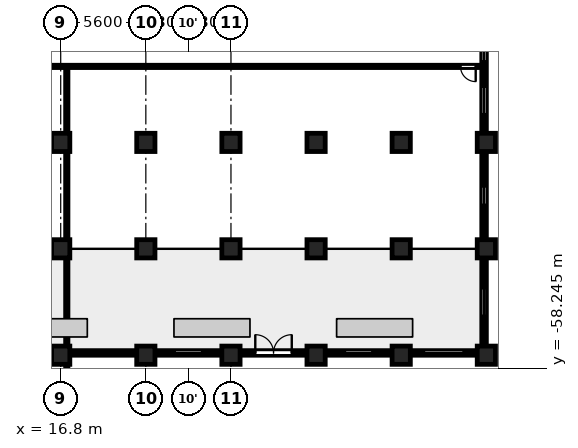
"""IFC4 building model, lengths in metres.
Left out: names, types, materials, properties, quantities, classifications, styles, units other than length and angle.
Written with IfcOpenShell. Run it as: python <this file> out.ifc"""

import sys

from ifc_helpers import new_model, si_unit, direction, frame, frame_2d, origin, origin_2d, place, context, subcontext, project, spatial, rectangle, circle, extrude, element, fill, save


model = new_model("IFC4")
c1 = context("Model", 3, precision=1e-05, world=origin(), true_north=direction((0.0, 1.0)))
c2 = subcontext(c1, "Body", "Model", "MODEL_VIEW")
j1 = project(units=[si_unit("LENGTHUNIT", "METRE"), si_unit("PLANEANGLEUNIT", "RADIAN")], contexts=[c1])
p1 = place(None, origin())
s1 = spatial("IfcSite", under=j1, at=p1, CompositionType="ELEMENT")
p2 = place(p1, origin())
s2 = spatial("IfcBuilding", under=s1, at=p2, CompositionType="ELEMENT")
p3 = place(p2, frame((0.0, 0.0, 6.5)))
s3 = spatial("IfcBuildingStorey", under=s2, at=p3, CompositionType="ELEMENT", Elevation=6.5)
for number, where, z_axis, x_axis in (
    (1, (16.8, -43.4, 0.0), (0.0, 0.0, 1.0), (1.0, 0.0, 0.0)),
    (2, (22.4, -43.4, 0.0), (0.0, 0.0, 1.0), (1.0, 0.0, 0.0)),
    (3, (28.0, -43.4, 0.0), (0.0, 0.0, 1.0), (1.0, 0.0, 0.0)),
    (4, (33.6, -43.4, 0.0), (0.0, 0.0, 1.0), (1.0, 0.0, 0.0)),
    (5, (39.2, -43.4, 0.0), (0.0, 0.0, 1.0), (1.0, 0.0, 0.0)),
    (6, (44.8, -43.4, 0.0), (0.0, 0.0, 1.0), (1.0, 0.0, 0.0)),
    (7, (16.8, -50.4, 0.0), (0.0, 0.0, 1.0), (1.0, 0.0, 0.0)),
    (8, (22.4, -50.4, 0.0), (0.0, 0.0, 1.0), (1.0, 0.0, 0.0)),
    (9, (28.0, -50.4, 0.0), (0.0, 0.0, 1.0), (1.0, 0.0, 0.0)),
    (10, (33.6, -50.4, 0.0), (0.0, 0.0, 1.0), (1.0, 0.0, 0.0)),
    (11, (39.2, -50.4, 0.0), (0.0, 0.0, 1.0), (1.0, 0.0, 0.0)),
    (12, (44.8, -50.4, 0.0), (0.0, 0.0, 1.0), (1.0, 0.0, 0.0)),
    (13, (16.8, -57.4, 0.0), (0.0, 0.0, 1.0), (1.0, 0.0, 0.0)),
    (14, (22.4, -57.4, 0.0), (0.0, 0.0, 1.0), (1.0, 0.0, 0.0)),
    (15, (28.0, -57.4, 0.0), (0.0, 0.0, 1.0), (1.0, 0.0, 0.0)),
    (16, (33.6, -57.4, 0.0), (0.0, 0.0, 1.0), (1.0, 0.0, 0.0)),
    (17, (39.2, -57.4, 0.0), (0.0, 0.0, 1.0), (1.0, 0.0, 0.0)),
    (18, (44.8, -57.4, 0.0), (0.0, 0.0, 1.0), (1.0, 0.0, 0.0)),
):
    element("IfcColumn", number, at=place(p3, frame(where, z_axis=z_axis, x_axis=x_axis)), inside=s3, PredefinedType="COLUMN", context=c2, shape_type="SweptSolid", body=[
        extrude(circle(Radius=0.6, at=origin_2d()), origin(), (0.0, 0.0, 1.0), 4.8),
    ])
p4 = place(p3, frame((44.65, -56.8, 0.0), z_axis=(0.0, 0.0, 1.0), x_axis=(0.0, 1.0, 0.0)))
e19 = element("IfcWall", 19, at=p4, inside=s3, PredefinedType="SOLIDWALL", context=c2, shape_type="SweptSolid", body=[
    extrude(rectangle(XDim=5.8, YDim=0.3, at=frame_2d((2.9, 0.0))), origin(), (0.0, 0.0, 1.0), 3.65),
])
p5 = place(p4, frame((2.0, 0.0, 0.9)))
e20 = element("IfcOpeningElement", 20, at=p5, cuts=e19, PredefinedType="OPENING", context=c2, shape_type="SweptSolid", body=[
    extrude(rectangle(XDim=1.8, YDim=1.25, at=frame_2d((0.9, 0.625))), frame((0.0, 0.16, 0.0), z_axis=(0.0, -1.0, 0.0), x_axis=(1.0, 0.0, 0.0)), (0.0, 0.0, 1.0), 0.32),
])
p6 = place(p3, frame((44.65, -49.8, 0.0), z_axis=(0.0, 0.0, 1.0), x_axis=(0.0, 1.0, 0.0)))
e21 = element("IfcWall", 21, at=p6, inside=s3, PredefinedType="SOLIDWALL", context=c2, shape_type="SweptSolid", body=[
    extrude(rectangle(XDim=5.8, YDim=0.3, at=frame_2d((2.9, 0.0))), origin(), (0.0, 0.0, 1.0), 3.65),
])
p7 = place(p6, frame((2.3, 0.0, 0.6)))
e22 = element("IfcOpeningElement", 22, at=p7, cuts=e21, PredefinedType="OPENING", context=c2, shape_type="SweptSolid", body=[
    extrude(rectangle(XDim=1.2, YDim=1.55, at=frame_2d((0.6, 0.775))), frame((0.0, 0.16, 0.0), z_axis=(0.0, -1.0, 0.0), x_axis=(1.0, 0.0, 0.0)), (0.0, 0.0, 1.0), 0.32),
])
p8 = place(p3, frame((44.65, -42.8, 0.0), z_axis=(0.0, 0.0, 1.0), x_axis=(0.0, 1.0, 0.0)))
e23 = element("IfcWall", 23, at=p8, inside=s3, PredefinedType="SOLIDWALL", context=c2, shape_type="SweptSolid", body=[
    extrude(rectangle(XDim=5.8, YDim=0.3, at=frame_2d((2.9, 0.0))), origin(), (0.0, 0.0, 1.0), 3.65),
])
p9 = place(p8, frame((1.262, 0.0, 0.9)))
e24 = element("IfcOpeningElement", 24, at=p9, cuts=e23, PredefinedType="OPENING", context=c2, shape_type="SweptSolid", body=[
    extrude(rectangle(XDim=1.8, YDim=1.25, at=frame_2d((0.9, 0.625))), frame((0.0, 0.16, 0.0), z_axis=(0.0, -1.0, 0.0), x_axis=(1.0, 0.0, 0.0)), (0.0, 0.0, 1.0), 0.32),
])
p10 = place(p8, frame((4.738, 0.0, 0.6)))
e25 = element("IfcOpeningElement", 25, at=p10, cuts=e23, PredefinedType="OPENING", context=c2, shape_type="SweptSolid", body=[
    extrude(rectangle(XDim=0.8, YDim=1.55, at=frame_2d((0.4, 0.775))), frame((0.0, 0.16, 0.0), z_axis=(0.0, -1.0, 0.0), x_axis=(1.0, 0.0, 0.0)), (0.0, 0.0, 1.0), 0.32),
])
p11 = place(p3, frame((17.4, -57.25, 0.0), z_axis=(0.0, 0.0, 1.0), x_axis=(1.0, 0.0, 0.0)))
e26 = element("IfcWall", 26, at=p11, inside=s3, PredefinedType="SOLIDWALL", context=c2, shape_type="SweptSolid", body=[
    extrude(rectangle(XDim=4.4, YDim=0.3, at=frame_2d((2.2, 0.0))), origin(), (0.0, 0.0, 1.0), 3.65),
])
p12 = place(p3, frame((23.0, -57.25, 0.0), z_axis=(0.0, 0.0, 1.0), x_axis=(1.0, 0.0, 0.0)))
e27 = element("IfcWall", 27, at=p12, inside=s3, PredefinedType="SOLIDWALL", context=c2, shape_type="SweptSolid", body=[
    extrude(rectangle(XDim=4.4, YDim=0.3, at=frame_2d((2.2, 0.0))), origin(), (0.0, 0.0, 1.0), 3.65),
])
p13 = place(p12, frame((1.3, 0.0, 0.9)))
e28 = element("IfcOpeningElement", 28, at=p13, cuts=e27, PredefinedType="OPENING", context=c2, shape_type="SweptSolid", body=[
    extrude(rectangle(XDim=1.8, YDim=1.25, at=frame_2d((0.9, 0.625))), frame((0.0, 0.16, 0.0), z_axis=(0.0, -1.0, 0.0), x_axis=(1.0, 0.0, 0.0)), (0.0, 0.0, 1.0), 0.32),
])
p14 = place(p3, frame((28.6, -57.25, 0.0), z_axis=(0.0, 0.0, 1.0), x_axis=(1.0, 0.0, 0.0)))
e29 = element("IfcWall", 29, at=p14, inside=s3, PredefinedType="SOLIDWALL", context=c2, shape_type="SweptSolid", body=[
    extrude(rectangle(XDim=4.4, YDim=0.3, at=frame_2d((2.2, 0.0))), origin(), (0.0, 0.0, 1.0), 3.65),
])
p15 = place(p14, frame((1.0, 0.0, 0.0)))
e30 = element("IfcOpeningElement", 30, at=p15, cuts=e29, PredefinedType="OPENING", context=c2, shape_type="SweptSolid", body=[
    extrude(rectangle(XDim=2.4, YDim=2.3, at=frame_2d((1.2, 1.15))), frame((0.0, 0.16, 0.0), z_axis=(0.0, -1.0, 0.0), x_axis=(1.0, 0.0, 0.0)), (0.0, 0.0, 1.0), 0.32),
])
p16 = place(p3, frame((34.2, -57.25, 0.0), z_axis=(0.0, 0.0, 1.0), x_axis=(1.0, 0.0, 0.0)))
e31 = element("IfcWall", 31, at=p16, inside=s3, PredefinedType="SOLIDWALL", context=c2, shape_type="SweptSolid", body=[
    extrude(rectangle(XDim=4.4, YDim=0.3, at=frame_2d((2.2, 0.0))), origin(), (0.0, 0.0, 1.0), 3.65),
])
p17 = place(p16, frame((1.3, 0.0, 0.9)))
e32 = element("IfcOpeningElement", 32, at=p17, cuts=e31, PredefinedType="OPENING", context=c2, shape_type="SweptSolid", body=[
    extrude(rectangle(XDim=1.8, YDim=1.25, at=frame_2d((0.9, 0.625))), frame((0.0, 0.16, 0.0), z_axis=(0.0, -1.0, 0.0), x_axis=(1.0, 0.0, 0.0)), (0.0, 0.0, 1.0), 0.32),
])
p18 = place(p3, frame((39.8, -57.25, 0.0), z_axis=(0.0, 0.0, 1.0), x_axis=(1.0, 0.0, 0.0)))
e33 = element("IfcWall", 33, at=p18, inside=s3, PredefinedType="SOLIDWALL", context=c2, shape_type="SweptSolid", body=[
    extrude(rectangle(XDim=4.4, YDim=0.3, at=frame_2d((2.2, 0.0))), origin(), (0.0, 0.0, 1.0), 3.65),
])
p19 = place(p18, frame((0.9, 0.0, 0.9)))
e34 = element("IfcOpeningElement", 34, at=p19, cuts=e33, PredefinedType="OPENING", context=c2, shape_type="SweptSolid", body=[
    extrude(rectangle(XDim=2.6, YDim=1.25, at=frame_2d((1.3, 0.625))), frame((0.0, 0.16, 0.0), z_axis=(0.0, -1.0, 0.0), x_axis=(1.0, 0.0, 0.0)), (0.0, 0.0, 1.0), 0.32),
])
p20 = place(p3, frame((-44.48, -38.4, 0.0), z_axis=(0.0, 0.0, 1.0), x_axis=(1.0, 0.0, 0.0)))
e35 = element("IfcWall", 35, at=p20, inside=s3, PredefinedType="PARTITIONING", context=c2, shape_type="SweptSolid", body=[
    extrude(rectangle(XDim=88.96, YDim=0.15, at=frame_2d((44.48, 0.0))), origin(), (0.0, 0.0, 1.0), 4.45),
])
p21 = place(p20, frame((0.42, 0.0, 0.0)))
e36 = element("IfcOpeningElement", 36, at=p21, cuts=e35, PredefinedType="OPENING", context=c2, shape_type="SweptSolid", body=[
    extrude(rectangle(XDim=1.0, YDim=2.1, at=frame_2d((0.5, 1.05))), frame((0.0, 0.085, 0.0), z_axis=(0.0, -1.0, 0.0), x_axis=(1.0, 0.0, 0.0)), (0.0, 0.0, 1.0), 0.17),
])
p22 = place(p20, frame((18.08, 0.0, 0.0)))
e37 = element("IfcOpeningElement", 37, at=p22, cuts=e35, PredefinedType="OPENING", context=c2, shape_type="SweptSolid", body=[
    extrude(rectangle(XDim=1.0, YDim=2.1, at=frame_2d((0.5, 1.05))), frame((0.0, 0.085, 0.0), z_axis=(0.0, -1.0, 0.0), x_axis=(1.0, 0.0, 0.0)), (0.0, 0.0, 1.0), 0.17),
])
p23 = place(p20, frame((20.33, 0.0, 0.0)))
e38 = element("IfcOpeningElement", 38, at=p23, cuts=e35, PredefinedType="OPENING", context=c2, shape_type="SweptSolid", body=[
    extrude(rectangle(XDim=1.0, YDim=2.1, at=frame_2d((0.5, 1.05))), frame((0.0, 0.085, 0.0), z_axis=(0.0, -1.0, 0.0), x_axis=(1.0, 0.0, 0.0)), (0.0, 0.0, 1.0), 0.17),
])
p24 = place(p20, frame((32.08, 0.0, 0.0)))
e39 = element("IfcOpeningElement", 39, at=p24, cuts=e35, PredefinedType="OPENING", context=c2, shape_type="SweptSolid", body=[
    extrude(rectangle(XDim=1.0, YDim=2.1, at=frame_2d((0.5, 1.05))), frame((0.0, 0.085, 0.0), z_axis=(0.0, -1.0, 0.0), x_axis=(1.0, 0.0, 0.0)), (0.0, 0.0, 1.0), 0.17),
])
p25 = place(p20, frame((34.33, 0.0, 0.0)))
e40 = element("IfcOpeningElement", 40, at=p25, cuts=e35, PredefinedType="OPENING", context=c2, shape_type="SweptSolid", body=[
    extrude(rectangle(XDim=1.0, YDim=2.1, at=frame_2d((0.5, 1.05))), frame((0.0, 0.085, 0.0), z_axis=(0.0, -1.0, 0.0), x_axis=(1.0, 0.0, 0.0)), (0.0, 0.0, 1.0), 0.17),
])
p26 = place(p20, frame((52.08, 0.0, 0.0)))
e41 = element("IfcOpeningElement", 41, at=p26, cuts=e35, PredefinedType="OPENING", context=c2, shape_type="SweptSolid", body=[
    extrude(rectangle(XDim=1.0, YDim=2.1, at=frame_2d((0.5, 1.05))), frame((0.0, 0.085, 0.0), z_axis=(0.0, -1.0, 0.0), x_axis=(1.0, 0.0, 0.0)), (0.0, 0.0, 1.0), 0.17),
])
p27 = place(p20, frame((54.33, 0.0, 0.0)))
e42 = element("IfcOpeningElement", 42, at=p27, cuts=e35, PredefinedType="OPENING", context=c2, shape_type="SweptSolid", body=[
    extrude(rectangle(XDim=0.9, YDim=2.1, at=frame_2d((0.45, 1.05))), frame((0.0, 0.085, 0.0), z_axis=(0.0, -1.0, 0.0), x_axis=(1.0, 0.0, 0.0)), (0.0, 0.0, 1.0), 0.17),
])
p28 = place(p20, frame((87.58, 0.0, 0.0)))
e43 = element("IfcOpeningElement", 43, at=p28, cuts=e35, PredefinedType="OPENING", context=c2, shape_type="SweptSolid", body=[
    extrude(rectangle(XDim=1.0, YDim=2.1, at=frame_2d((0.5, 1.05))), frame((0.0, 0.085, 0.0), z_axis=(0.0, -1.0, 0.0), x_axis=(1.0, 0.0, 0.0)), (0.0, 0.0, 1.0), 0.17),
])
p29 = place(p3, frame((17.2, -58.23, 0.0), z_axis=(0.0, 0.0, 1.0), x_axis=(0.0, 1.0, 0.0)))
e44 = element("IfcWall", 44, at=p29, inside=s3, PredefinedType="PARTITIONING", context=c2, shape_type="SweptSolid", body=[
    extrude(rectangle(XDim=19.755, YDim=0.15, at=frame_2d((9.877, 0.0))), origin(), (0.0, 0.0, 1.0), 4.45),
])
p30 = place(p15, origin())
e45 = element("IfcDoor", 45, at=p30, inside=s3, OperationType="SINGLE_SWING_LEFT", PredefinedType="DOOR", context=c2, shape_type="SweptSolid", body=[
    extrude(rectangle(XDim=2.4, YDim=2.3, at=frame_2d((1.2, 1.15))), frame((0.0, 0.025, 0.0), z_axis=(0.0, -1.0, 0.0), x_axis=(1.0, 0.0, 0.0)), (0.0, 0.0, 1.0), 0.05),
])
fill(e30, e45)
p31 = place(p28, origin())
e46 = element("IfcDoor", 46, at=p31, inside=s3, OperationType="SINGLE_SWING_RIGHT", PredefinedType="DOOR", context=c2, shape_type="SweptSolid", body=[
    extrude(rectangle(XDim=1.0, YDim=2.1, at=frame_2d((0.5, 1.05))), frame((0.0, 0.025, 0.0), z_axis=(0.0, -1.0, 0.0), x_axis=(1.0, 0.0, 0.0)), (0.0, 0.0, 1.0), 0.05),
])
fill(e43, e46)
p32 = place(p5, origin())
e47 = element("IfcWindow", 47, at=p32, inside=s3, PartitioningType="SINGLE_PANEL", PredefinedType="WINDOW", context=c2, shape_type="SweptSolid", body=[
    extrude(rectangle(XDim=1.8, YDim=1.25, at=frame_2d((0.9, 0.625))), frame((0.0, 0.03, 0.0), z_axis=(0.0, -1.0, 0.0), x_axis=(1.0, 0.0, 0.0)), (0.0, 0.0, 1.0), 0.06),
])
fill(e20, e47)
p33 = place(p7, origin())
e48 = element("IfcWindow", 48, at=p33, inside=s3, PartitioningType="SINGLE_PANEL", PredefinedType="WINDOW", context=c2, shape_type="SweptSolid", body=[
    extrude(rectangle(XDim=1.2, YDim=1.55, at=frame_2d((0.6, 0.775))), frame((0.0, 0.03, 0.0), z_axis=(0.0, -1.0, 0.0), x_axis=(1.0, 0.0, 0.0)), (0.0, 0.0, 1.0), 0.06),
])
fill(e22, e48)
p34 = place(p9, origin())
e49 = element("IfcWindow", 49, at=p34, inside=s3, PartitioningType="SINGLE_PANEL", PredefinedType="WINDOW", context=c2, shape_type="SweptSolid", body=[
    extrude(rectangle(XDim=1.8, YDim=1.25, at=frame_2d((0.9, 0.625))), frame((0.0, 0.03, 0.0), z_axis=(0.0, -1.0, 0.0), x_axis=(1.0, 0.0, 0.0)), (0.0, 0.0, 1.0), 0.06),
])
fill(e24, e49)
p35 = place(p10, origin())
e50 = element("IfcWindow", 50, at=p35, inside=s3, PartitioningType="SINGLE_PANEL", PredefinedType="WINDOW", context=c2, shape_type="SweptSolid", body=[
    extrude(rectangle(XDim=0.8, YDim=1.55, at=frame_2d((0.4, 0.775))), frame((0.0, 0.03, 0.0), z_axis=(0.0, -1.0, 0.0), x_axis=(1.0, 0.0, 0.0)), (0.0, 0.0, 1.0), 0.06),
])
fill(e25, e50)
p36 = place(p13, origin())
e51 = element("IfcWindow", 51, at=p36, inside=s3, PartitioningType="SINGLE_PANEL", PredefinedType="WINDOW", context=c2, shape_type="SweptSolid", body=[
    extrude(rectangle(XDim=1.8, YDim=1.25, at=frame_2d((0.9, 0.625))), frame((0.0, 0.03, 0.0), z_axis=(0.0, -1.0, 0.0), x_axis=(1.0, 0.0, 0.0)), (0.0, 0.0, 1.0), 0.06),
])
fill(e28, e51)
p37 = place(p17, origin())
e52 = element("IfcWindow", 52, at=p37, inside=s3, PartitioningType="SINGLE_PANEL", PredefinedType="WINDOW", context=c2, shape_type="SweptSolid", body=[
    extrude(rectangle(XDim=1.8, YDim=1.25, at=frame_2d((0.9, 0.625))), frame((0.0, 0.03, 0.0), z_axis=(0.0, -1.0, 0.0), x_axis=(1.0, 0.0, 0.0)), (0.0, 0.0, 1.0), 0.06),
])
fill(e32, e52)
p38 = place(p19, origin())
e53 = element("IfcWindow", 53, at=p38, inside=s3, PartitioningType="SINGLE_PANEL", PredefinedType="WINDOW", context=c2, shape_type="SweptSolid", body=[
    extrude(rectangle(XDim=2.6, YDim=1.25, at=frame_2d((1.3, 0.625))), frame((0.0, 0.03, 0.0), z_axis=(0.0, -1.0, 0.0), x_axis=(1.0, 0.0, 0.0)), (0.0, 0.0, 1.0), 0.06),
])
fill(e34, e53)
save(model, sys.argv[1])
